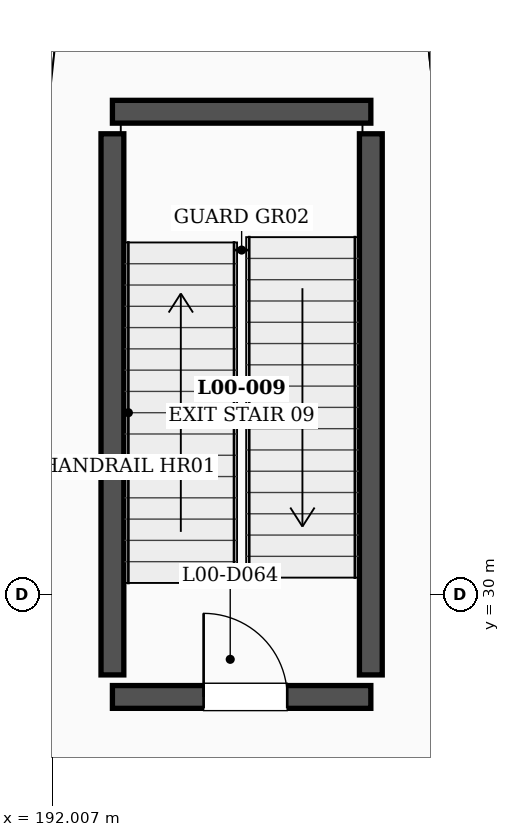
"""IFC4 building model, lengths in metres.
Left out: names, types, materials, properties, quantities, classifications, styles, units other than length and angle.
Written with IfcOpenShell. Run it as: python <this file> out.ifc"""

import sys

from ifc_helpers import new_model, si_unit, direction, frame, frame_2d, origin, place, context, subcontext, project, spatial, rectangle, extrude, element, fill, save


model = new_model("IFC4")
c1 = context("Model", 3, precision=1e-05, world=origin(), true_north=direction((0.0, 1.0)))
c2 = subcontext(c1, "Body", "Model", "MODEL_VIEW")
j1 = project(units=[si_unit("LENGTHUNIT", "METRE"), si_unit("PLANEANGLEUNIT", "RADIAN")], contexts=[c1])
p1 = place(None, origin())
s1 = spatial("IfcSite", under=j1, at=p1, CompositionType="ELEMENT")
p2 = place(p1, origin())
s2 = spatial("IfcBuilding", under=s1, at=p2, CompositionType="ELEMENT")
p3 = place(p2, origin())
s3 = spatial("IfcBuildingStorey", under=s2, at=p3, CompositionType="ELEMENT", Elevation=0.0)
p4 = place(p3, frame((192.8, 28.65, 0.0), z_axis=(0.0, 0.0, 1.0), x_axis=(1.0, 0.0, 0.0)))
e1 = element("IfcWall", 1, at=p4, inside=s3, PredefinedType="SHEAR", context=c2, shape_type="SweptSolid", body=[
    extrude(rectangle(XDim=3.4, YDim=0.3, at=frame_2d((1.7, 0.0))), origin(), (0.0, 0.0, 1.0), 6.0),
])
p5 = place(p4, frame((1.2, 0.0, 0.0)))
e2 = element("IfcOpeningElement", 2, at=p5, cuts=e1, PredefinedType="OPENING", context=c2, shape_type="SweptSolid", body=[
    extrude(rectangle(XDim=1.1, YDim=2.2, at=frame_2d((0.55, 1.1))), frame((0.0, 0.16, 0.0), z_axis=(0.0, -1.0, 0.0), x_axis=(1.0, 0.0, 0.0)), (0.0, 0.0, 1.0), 0.32),
])
p6 = place(p3, frame((192.8, 36.35, 0.0), z_axis=(0.0, 0.0, 1.0), x_axis=(1.0, 0.0, 0.0)))
e3 = element("IfcWall", 3, at=p6, inside=s3, PredefinedType="SHEAR", context=c2, shape_type="SweptSolid", body=[
    extrude(rectangle(XDim=3.4, YDim=0.3, at=frame_2d((1.7, 0.0))), origin(), (0.0, 0.0, 1.0), 6.0),
])
for number, where, z_axis, x_axis in (
    (4, (192.8, 28.94, 0.0), (0.0, 0.0, 1.0), (0.0, 1.0, 0.0)),
    (5, (196.2, 28.94, 0.0), (0.0, 0.0, 1.0), (0.0, 1.0, 0.0)),
):
    element("IfcWall", number, at=place(p3, frame(where, z_axis=z_axis, x_axis=x_axis)), inside=s3, PredefinedType="SHEAR", context=c2, shape_type="SweptSolid", body=[
        extrude(rectangle(XDim=7.12, YDim=0.3, at=frame_2d((3.56, 0.0))), origin(), (0.0, 0.0, 1.0), 6.0),
    ])
p7 = place(p5, origin())
e6 = element("IfcDoor", 6, at=p7, inside=s3, OperationType="SINGLE_SWING_LEFT", PredefinedType="DOOR", context=c2, shape_type="SweptSolid", body=[
    extrude(rectangle(XDim=1.1, YDim=2.2, at=frame_2d((0.55, 1.1))), frame((0.0, 0.025, 0.0), z_axis=(0.0, -1.0, 0.0), x_axis=(1.0, 0.0, 0.0)), (0.0, 0.0, 1.0), 0.05),
])
fill(e2, e6)
save(model, sys.argv[1])
